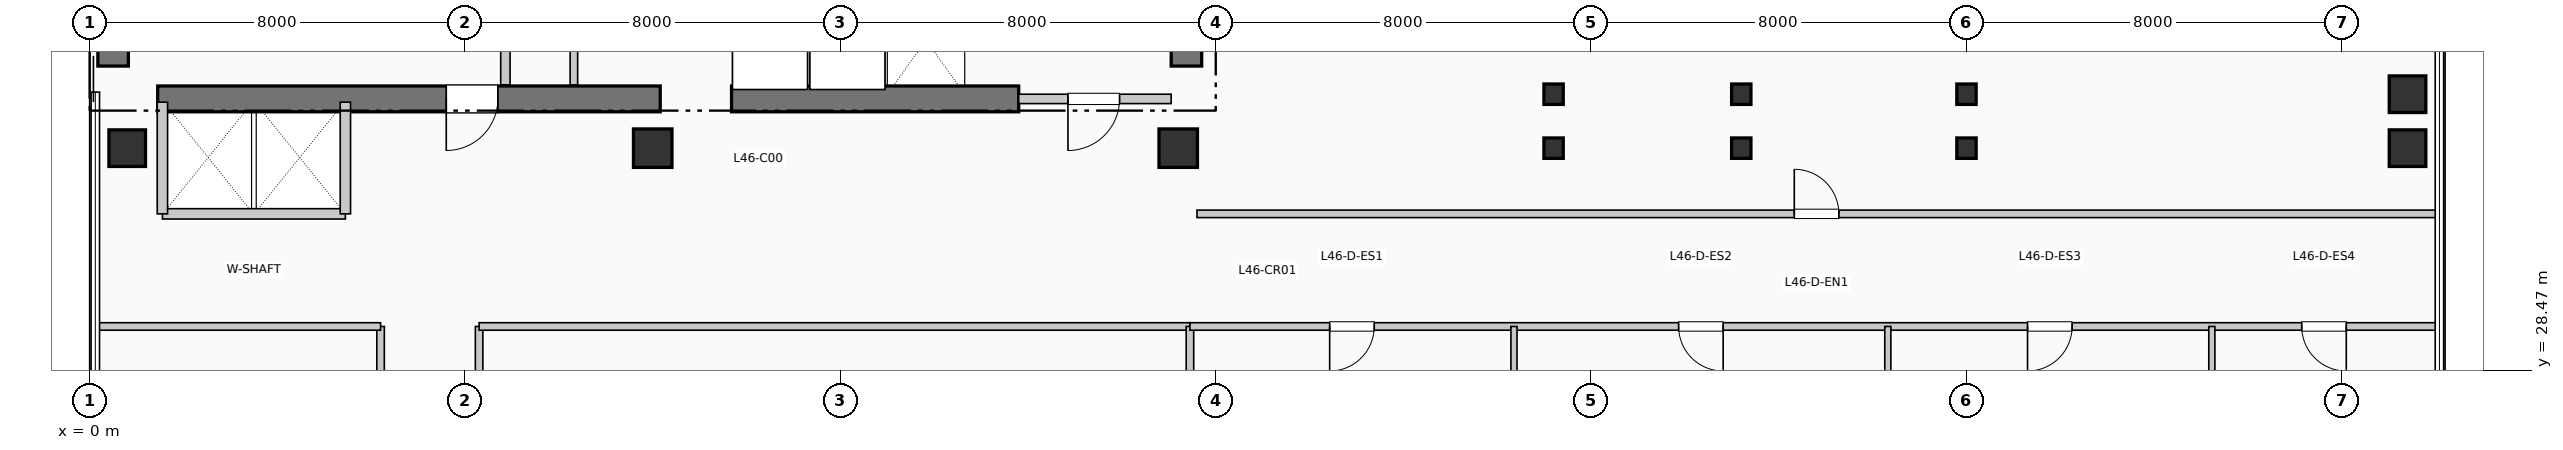
"""IFC4 building model, lengths in metres.
Left out: names, types, materials, properties, quantities, classifications, styles, units other than length and angle.
Written with IfcOpenShell. Run it as: python <this file> out.ifc"""

import sys

from ifc_helpers import new_model, si_unit, direction, frame, frame_2d, origin, origin_2d, place, context, subcontext, project, spatial, rectangle, i_section, extrude, element, fill, save


model = new_model("IFC4")
c1 = context("Model", 3, precision=1e-05, world=origin(), true_north=direction((0.0, 1.0)))
c2 = subcontext(c1, "Body", "Model", "MODEL_VIEW")
j1 = project(units=[si_unit("LENGTHUNIT", "METRE"), si_unit("PLANEANGLEUNIT", "RADIAN")], contexts=[c1])
p1 = place(None, origin())
s1 = spatial("IfcSite", under=j1, at=p1, CompositionType="ELEMENT")
p2 = place(p1, origin())
s2 = spatial("IfcBuilding", under=s1, at=p2, CompositionType="ELEMENT")
p3 = place(p2, frame((0.0, 0.0, 191.4)))
s3 = spatial("IfcBuildingStorey", under=s2, at=p3, CompositionType="ELEMENT", Elevation=191.4)
p4 = place(p3, frame((0.5, 34.95, 0.0), z_axis=(0.0, 0.0, 1.0), x_axis=(0.0, 1.0, 0.0)))
e1 = element("IfcWall", 1, at=p4, inside=s3, PredefinedType="SHEAR", context=c2, shape_type="SweptSolid", body=[
    extrude(rectangle(XDim=7.9, YDim=0.65, at=frame_2d((3.95, 0.0))), origin(), (0.0, 0.0, 1.0), 3.96),
])
p5 = place(p3, frame((23.375, 34.95, 0.0), z_axis=(0.0, 0.0, 1.0), x_axis=(0.0, 1.0, 0.0)))
e2 = element("IfcWall", 2, at=p5, inside=s3, PredefinedType="SHEAR", context=c2, shape_type="SweptSolid", body=[
    extrude(rectangle(XDim=10.64, YDim=0.65, at=frame_2d((5.32, 0.0))), origin(), (0.0, 0.0, 1.0), 3.96),
])
p6 = place(p3, frame((1.45, 34.25, 0.0), z_axis=(0.0, 0.0, 1.0), x_axis=(1.0, 0.0, 0.0)))
e3 = element("IfcWall", 3, at=p6, inside=s3, PredefinedType="SHEAR", context=c2, shape_type="SweptSolid", body=[
    extrude(rectangle(XDim=10.71, YDim=0.55, at=frame_2d((5.355, 0.0))), origin(), (0.0, 0.0, 1.0), 3.96),
])
p7 = place(p6, frame((7.25, 0.0, 0.0), z_axis=(0.0, 0.0, 1.0), x_axis=(-1.0, 0.0, 0.0)))
e4 = element("IfcOpeningElement", 4, at=p7, cuts=e3, PredefinedType="OPENING", context=c2, shape_type="SweptSolid", body=[
    extrude(rectangle(XDim=1.1, YDim=2.15, at=frame_2d((0.55, 1.075))), frame((0.0, 0.285, 0.0), z_axis=(0.0, -1.0, 0.0), x_axis=(1.0, 0.0, 0.0)), (0.0, 0.0, 1.0), 0.57),
])
p8 = place(p3, frame((13.68, 34.25, 0.0), z_axis=(0.0, 0.0, 1.0), x_axis=(1.0, 0.0, 0.0)))
e5 = element("IfcWall", 5, at=p8, inside=s3, PredefinedType="SHEAR", context=c2, shape_type="SweptSolid", body=[
    extrude(rectangle(XDim=6.12, YDim=0.55, at=frame_2d((3.06, 0.0))), origin(), (0.0, 0.0, 1.0), 3.96),
])
p9 = place(p3, frame((0.8, 33.2, 0.0), z_axis=(0.0, 0.0, 1.0), x_axis=(1.0, 0.0, 0.0)))
e6 = element("IfcColumn", 6, at=p9, inside=s3, PredefinedType="COLUMN", context=c2, shape_type="SweptSolid", body=[
    extrude(rectangle(XDim=0.78, YDim=0.78, at=origin_2d()), origin(), (0.0, 0.0, 1.0), 3.96),
])
for number, where, z_axis, x_axis in (
    (7, (12.0, 33.2, 0.0), (0.0, 0.0, 1.0), (1.0, 0.0, 0.0)),
    (8, (23.2, 33.2, 0.0), (0.0, 0.0, 1.0), (1.0, 0.0, 0.0)),
):
    element("IfcColumn", number, at=place(p3, frame(where, z_axis=z_axis, x_axis=x_axis)), inside=s3, PredefinedType="COLUMN", context=c2, shape_type="SweptSolid", body=[
        extrude(rectangle(XDim=0.82, YDim=0.82, at=origin_2d()), origin(), (0.0, 0.0, 1.0), 3.96),
    ])
for number, where, z_axis, x_axis in (
    (9, (31.2, 33.2, 0.0), (0.0, 0.0, 1.0), (1.0, 0.0, 0.0)),
    (10, (31.2, 34.35, 0.0), (0.0, 0.0, 1.0), (1.0, 0.0, 0.0)),
    (11, (35.2, 33.2, 0.0), (0.0, 0.0, 1.0), (1.0, 0.0, 0.0)),
    (12, (35.2, 34.35, 0.0), (0.0, 0.0, 1.0), (1.0, 0.0, 0.0)),
    (13, (40.0, 33.2, 0.0), (0.0, 0.0, 1.0), (1.0, 0.0, 0.0)),
    (14, (40.0, 34.35, 0.0), (0.0, 0.0, 1.0), (1.0, 0.0, 0.0)),
):
    element("IfcColumn", number, at=place(p3, frame(where, z_axis=z_axis, x_axis=x_axis)), inside=s3, PredefinedType="COLUMN", context=c2, shape_type="SweptSolid", body=[
        extrude(i_section(OverallWidth=0.412, OverallDepth=0.435, WebThickness=0.027, FlangeThickness=0.043, at=origin_2d()), origin(), (0.0, 0.0, 1.0), 3.96),
    ])
for number, where, z_axis, x_axis in (
    (15, (49.4, 33.2, 0.0), (0.0, 0.0, 1.0), (1.0, 0.0, 0.0)),
    (16, (49.4, 34.35, 0.0), (0.0, 0.0, 1.0), (1.0, 0.0, 0.0)),
):
    element("IfcColumn", number, at=place(p3, frame(where, z_axis=z_axis, x_axis=x_axis)), inside=s3, PredefinedType="COLUMN", context=c2, shape_type="SweptSolid", body=[
        extrude(rectangle(XDim=0.78, YDim=0.78, at=origin_2d()), origin(), (0.0, 0.0, 1.0), 3.96),
    ])
p10 = place(p3, frame((8.86, 34.55, 0.0), z_axis=(0.0, 0.0, 1.0), x_axis=(0.0, 1.0, 0.0)))
e17 = element("IfcWall", 17, at=p10, inside=s3, PredefinedType="PARTITIONING", context=c2, shape_type="SweptSolid", body=[
    extrude(rectangle(XDim=2.5, YDim=0.2, at=frame_2d((1.25, 0.0))), origin(), (0.0, 0.0, 1.0), 3.71),
])
p11 = place(p3, frame((19.8, 34.25, 0.0), z_axis=(0.0, 0.0, 1.0), x_axis=(1.0, 0.0, 0.0)))
e18 = element("IfcWall", 18, at=p11, inside=s3, PredefinedType="PARTITIONING", context=c2, shape_type="SweptSolid", body=[
    extrude(rectangle(XDim=3.25, YDim=0.2, at=frame_2d((1.625, 0.0))), origin(), (0.0, 0.0, 1.0), 3.71),
])
p12 = place(p11, frame((2.15, 0.0, 0.0), z_axis=(0.0, 0.0, 1.0), x_axis=(-1.0, 0.0, 0.0)))
e19 = element("IfcOpeningElement", 19, at=p12, cuts=e18, PredefinedType="OPENING", context=c2, shape_type="SweptSolid", body=[
    extrude(rectangle(XDim=1.1, YDim=2.15, at=frame_2d((0.55, 1.075))), frame((0.0, 0.11, 0.0), z_axis=(0.0, -1.0, 0.0), x_axis=(1.0, 0.0, 0.0)), (0.0, 0.0, 1.0), 0.22),
])
p13 = place(p3, frame((1.55, 31.8, 0.0), z_axis=(0.0, 0.0, 1.0), x_axis=(1.0, 0.0, 0.0)))
e20 = element("IfcWall", 20, at=p13, inside=s3, PredefinedType="PARTITIONING", context=c2, shape_type="SweptSolid", body=[
    extrude(rectangle(XDim=3.9, YDim=0.22, at=frame_2d((1.95, 0.0))), origin(), (0.0, 0.0, 1.0), 3.71),
])
for number, where, z_axis, x_axis in (
    (21, (1.55, 31.8, 0.0), (0.0, 0.0, 1.0), (0.0, 1.0, 0.0)),
    (22, (5.45, 31.8, 0.0), (0.0, 0.0, 1.0), (0.0, 1.0, 0.0)),
):
    element("IfcWall", number, at=place(p3, frame(where, z_axis=z_axis, x_axis=x_axis)), inside=s3, PredefinedType="PARTITIONING", context=c2, shape_type="SweptSolid", body=[
        extrude(rectangle(XDim=2.38, YDim=0.22, at=frame_2d((1.19, 0.0))), origin(), (0.0, 0.0, 1.0), 3.71),
    ])
p14 = place(p3, frame((10.32, 34.55, 0.0), z_axis=(0.0, 0.0, 1.0), x_axis=(0.0, 1.0, 0.0)))
e23 = element("IfcWall", 23, at=p14, inside=s3, PredefinedType="PARTITIONING", context=c2, shape_type="SweptSolid", body=[
    extrude(rectangle(XDim=2.15, YDim=0.16, at=frame_2d((1.075, 0.0))), origin(), (0.0, 0.0, 1.0), 3.71),
])
p15 = place(p3, frame((6.2, 10.2, 0.0), z_axis=(0.0, 0.0, 1.0), x_axis=(0.0, 1.0, 0.0)))
e24 = element("IfcWall", 24, at=p15, inside=s3, PredefinedType="PARTITIONING", context=c2, shape_type="SweptSolid", body=[
    extrude(rectangle(XDim=19.2, YDim=0.16, at=frame_2d((9.6, 0.0))), origin(), (0.0, 0.0, 1.0), 3.71),
])
p16 = place(p15, frame((3.739, 0.0, 0.0), z_axis=(0.0, 0.0, 1.0), x_axis=(-1.0, 0.0, 0.0)))
e25 = element("IfcOpeningElement", 25, at=p16, cuts=e24, PredefinedType="OPENING", context=c2, shape_type="SweptSolid", body=[
    extrude(rectangle(XDim=0.95, YDim=2.15, at=frame_2d((0.475, 1.075))), frame((0.0, 0.09, 0.0), z_axis=(0.0, -1.0, 0.0), x_axis=(1.0, 0.0, 0.0)), (0.0, 0.0, 1.0), 0.18),
])
p17 = place(p15, frame((10.075, 0.0, 0.0), z_axis=(0.0, 0.0, 1.0), x_axis=(-1.0, 0.0, 0.0)))
e26 = element("IfcOpeningElement", 26, at=p17, cuts=e24, PredefinedType="OPENING", context=c2, shape_type="SweptSolid", body=[
    extrude(rectangle(XDim=0.95, YDim=2.15, at=frame_2d((0.475, 1.075))), frame((0.0, 0.09, 0.0), z_axis=(0.0, -1.0, 0.0), x_axis=(1.0, 0.0, 0.0)), (0.0, 0.0, 1.0), 0.18),
])
p18 = place(p15, frame((16.411, 0.0, 0.0), z_axis=(0.0, 0.0, 1.0), x_axis=(-1.0, 0.0, 0.0)))
e27 = element("IfcOpeningElement", 27, at=p18, cuts=e24, PredefinedType="OPENING", context=c2, shape_type="SweptSolid", body=[
    extrude(rectangle(XDim=0.95, YDim=2.15, at=frame_2d((0.475, 1.075))), frame((0.0, 0.09, 0.0), z_axis=(0.0, -1.0, 0.0), x_axis=(1.0, 0.0, 0.0)), (0.0, 0.0, 1.0), 0.18),
])
p19 = place(p3, frame((8.3, 10.2, 0.0), z_axis=(0.0, 0.0, 1.0), x_axis=(0.0, 1.0, 0.0)))
e28 = element("IfcWall", 28, at=p19, inside=s3, PredefinedType="PARTITIONING", context=c2, shape_type="SweptSolid", body=[
    extrude(rectangle(XDim=19.2, YDim=0.16, at=frame_2d((9.6, 0.0))), origin(), (0.0, 0.0, 1.0), 3.71),
])
p20 = place(p19, frame((1.925, 0.0, 0.0)))
e29 = element("IfcOpeningElement", 29, at=p20, cuts=e28, PredefinedType="OPENING", context=c2, shape_type="SweptSolid", body=[
    extrude(rectangle(XDim=0.95, YDim=2.15, at=frame_2d((0.475, 1.075))), frame((0.0, 0.09, 0.0), z_axis=(0.0, -1.0, 0.0), x_axis=(1.0, 0.0, 0.0)), (0.0, 0.0, 1.0), 0.18),
])
p21 = place(p19, frame((7.301, 0.0, 0.0)))
e30 = element("IfcOpeningElement", 30, at=p21, cuts=e28, PredefinedType="OPENING", context=c2, shape_type="SweptSolid", body=[
    extrude(rectangle(XDim=0.95, YDim=2.15, at=frame_2d((0.475, 1.075))), frame((0.0, 0.09, 0.0), z_axis=(0.0, -1.0, 0.0), x_axis=(1.0, 0.0, 0.0)), (0.0, 0.0, 1.0), 0.18),
])
p22 = place(p19, frame((14.501, 0.0, 0.0)))
e31 = element("IfcOpeningElement", 31, at=p22, cuts=e28, PredefinedType="OPENING", context=c2, shape_type="SweptSolid", body=[
    extrude(rectangle(XDim=0.95, YDim=2.15, at=frame_2d((0.475, 1.075))), frame((0.0, 0.09, 0.0), z_axis=(0.0, -1.0, 0.0), x_axis=(1.0, 0.0, 0.0)), (0.0, 0.0, 1.0), 0.18),
])
p23 = place(p3, frame((0.19, 29.4, 0.0), z_axis=(0.0, 0.0, 1.0), x_axis=(1.0, 0.0, 0.0)))
e32 = element("IfcWall", 32, at=p23, inside=s3, PredefinedType="PARTITIONING", context=c2, shape_type="SweptSolid", body=[
    extrude(rectangle(XDim=6.01, YDim=0.16, at=frame_2d((3.005, 0.0))), origin(), (0.0, 0.0, 1.0), 3.365),
])
p24 = place(p3, frame((8.3, 29.4, 0.0), z_axis=(0.0, 0.0, 1.0), x_axis=(1.0, 0.0, 0.0)))
e33 = element("IfcWall", 33, at=p24, inside=s3, PredefinedType="PARTITIONING", context=c2, shape_type="SweptSolid", body=[
    extrude(rectangle(XDim=15.15, YDim=0.16, at=frame_2d((7.575, 0.0))), origin(), (0.0, 0.0, 1.0), 3.365),
])
p25 = place(p3, frame((23.45, 5.99, 0.0), z_axis=(0.0, 0.0, 1.0), x_axis=(0.0, 1.0, 0.0)))
e34 = element("IfcWall", 34, at=p25, inside=s3, PredefinedType="PARTITIONING", context=c2, shape_type="SweptSolid", body=[
    extrude(rectangle(XDim=23.41, YDim=0.16, at=frame_2d((11.705, 0.0))), origin(), (0.0, 0.0, 1.0), 3.095),
])
p26 = place(p3, frame((23.45, 29.4, 0.0), z_axis=(0.0, 0.0, 1.0), x_axis=(1.0, 0.0, 0.0)))
e35 = element("IfcWall", 35, at=p26, inside=s3, PredefinedType="PARTITIONING", context=c2, shape_type="SweptSolid", body=[
    extrude(rectangle(XDim=26.56, YDim=0.16, at=frame_2d((13.28, 0.0))), origin(), (0.0, 0.0, 1.0), 3.365),
])
p27 = place(p26, frame((3.928, 0.0, 0.0), z_axis=(0.0, 0.0, 1.0), x_axis=(-1.0, 0.0, 0.0)))
e36 = element("IfcOpeningElement", 36, at=p27, cuts=e35, PredefinedType="OPENING", context=c2, shape_type="SweptSolid", body=[
    extrude(rectangle(XDim=0.95, YDim=2.15, at=frame_2d((0.475, 1.075))), frame((0.0, 0.09, 0.0), z_axis=(0.0, -1.0, 0.0), x_axis=(1.0, 0.0, 0.0)), (0.0, 0.0, 1.0), 0.18),
])
p28 = place(p26, frame((11.365, 0.0, 0.0), z_axis=(0.0, 0.0, 1.0), x_axis=(-1.0, 0.0, 0.0)))
e37 = element("IfcOpeningElement", 37, at=p28, cuts=e35, PredefinedType="OPENING", context=c2, shape_type="SweptSolid", body=[
    extrude(rectangle(XDim=0.95, YDim=2.15, at=frame_2d((0.475, 1.075))), frame((0.0, 0.09, 0.0), z_axis=(0.0, -1.0, 0.0), x_axis=(1.0, 0.0, 0.0)), (0.0, 0.0, 1.0), 0.18),
])
p29 = place(p26, frame((18.801, 0.0, 0.0), z_axis=(0.0, 0.0, 1.0), x_axis=(-1.0, 0.0, 0.0)))
e38 = element("IfcOpeningElement", 38, at=p29, cuts=e35, PredefinedType="OPENING", context=c2, shape_type="SweptSolid", body=[
    extrude(rectangle(XDim=0.95, YDim=2.15, at=frame_2d((0.475, 1.075))), frame((0.0, 0.09, 0.0), z_axis=(0.0, -1.0, 0.0), x_axis=(1.0, 0.0, 0.0)), (0.0, 0.0, 1.0), 0.18),
])
p30 = place(p26, frame((24.645, 0.0, 0.0), z_axis=(0.0, 0.0, 1.0), x_axis=(-1.0, 0.0, 0.0)))
e39 = element("IfcOpeningElement", 39, at=p30, cuts=e35, PredefinedType="OPENING", context=c2, shape_type="SweptSolid", body=[
    extrude(rectangle(XDim=0.95, YDim=2.15, at=frame_2d((0.475, 1.075))), frame((0.0, 0.09, 0.0), z_axis=(0.0, -1.0, 0.0), x_axis=(1.0, 0.0, 0.0)), (0.0, 0.0, 1.0), 0.18),
])
p31 = place(p3, frame((23.6, 31.8, 0.0), z_axis=(0.0, 0.0, 1.0), x_axis=(1.0, 0.0, 0.0)))
e40 = element("IfcWall", 40, at=p31, inside=s3, PredefinedType="PARTITIONING", context=c2, shape_type="SweptSolid", body=[
    extrude(rectangle(XDim=26.41, YDim=0.16, at=frame_2d((13.205, 0.0))), origin(), (0.0, 0.0, 1.0), 3.71),
])
p32 = place(p31, frame((12.73, 0.0, 0.0)))
e41 = element("IfcOpeningElement", 41, at=p32, cuts=e40, PredefinedType="OPENING", context=c2, shape_type="SweptSolid", body=[
    extrude(rectangle(XDim=0.95, YDim=2.15, at=frame_2d((0.475, 1.075))), frame((0.0, 0.09, 0.0), z_axis=(0.0, -1.0, 0.0), x_axis=(1.0, 0.0, 0.0)), (0.0, 0.0, 1.0), 0.18),
])
for number, where, z_axis, x_axis in (
    (42, (30.356, 22.19, 0.0), (0.0, 0.0, 1.0), (0.0, 1.0, 0.0)),
    (43, (38.323, 22.19, 0.0), (0.0, 0.0, 1.0), (0.0, 1.0, 0.0)),
    (44, (45.229, 22.19, 0.0), (0.0, 0.0, 1.0), (0.0, 1.0, 0.0)),
):
    element("IfcWall", number, at=place(p3, frame(where, z_axis=z_axis, x_axis=x_axis)), inside=s3, PredefinedType="PARTITIONING", context=c2, shape_type="SweptSolid", body=[
        extrude(rectangle(XDim=7.21, YDim=0.13, at=frame_2d((3.605, 0.0))), origin(), (0.0, 0.0, 1.0), 3.71),
    ])
p33 = place(p7, origin())
e45 = element("IfcDoor", 45, at=p33, inside=s3, OperationType="SINGLE_SWING_LEFT", PredefinedType="DOOR", context=c2, shape_type="SweptSolid", body=[
    extrude(rectangle(XDim=1.1, YDim=2.15, at=frame_2d((0.55, 1.075))), frame((0.0, 0.025, 0.0), z_axis=(0.0, -1.0, 0.0), x_axis=(1.0, 0.0, 0.0)), (0.0, 0.0, 1.0), 0.05),
])
fill(e4, e45)
p34 = place(p12, origin())
e46 = element("IfcDoor", 46, at=p34, inside=s3, OperationType="SINGLE_SWING_LEFT", PredefinedType="DOOR", context=c2, shape_type="SweptSolid", body=[
    extrude(rectangle(XDim=1.1, YDim=2.15, at=frame_2d((0.55, 1.075))), frame((0.0, 0.025, 0.0), z_axis=(0.0, -1.0, 0.0), x_axis=(1.0, 0.0, 0.0)), (0.0, 0.0, 1.0), 0.05),
])
fill(e19, e46)
p35 = place(p27, origin())
e47 = element("IfcDoor", 47, at=p35, inside=s3, OperationType="SINGLE_SWING_LEFT", PredefinedType="DOOR", context=c2, shape_type="SweptSolid", body=[
    extrude(rectangle(XDim=0.95, YDim=2.15, at=frame_2d((0.475, 1.075))), frame((0.0, 0.025, 0.0), z_axis=(0.0, -1.0, 0.0), x_axis=(1.0, 0.0, 0.0)), (0.0, 0.0, 1.0), 0.05),
])
fill(e36, e47)
p36 = place(p28, origin())
e48 = element("IfcDoor", 48, at=p36, inside=s3, OperationType="SINGLE_SWING_RIGHT", PredefinedType="DOOR", context=c2, shape_type="SweptSolid", body=[
    extrude(rectangle(XDim=0.95, YDim=2.15, at=frame_2d((0.475, 1.075))), frame((0.0, 0.025, 0.0), z_axis=(0.0, -1.0, 0.0), x_axis=(1.0, 0.0, 0.0)), (0.0, 0.0, 1.0), 0.05),
])
fill(e37, e48)
p37 = place(p29, origin())
e49 = element("IfcDoor", 49, at=p37, inside=s3, OperationType="SINGLE_SWING_LEFT", PredefinedType="DOOR", context=c2, shape_type="SweptSolid", body=[
    extrude(rectangle(XDim=0.95, YDim=2.15, at=frame_2d((0.475, 1.075))), frame((0.0, 0.025, 0.0), z_axis=(0.0, -1.0, 0.0), x_axis=(1.0, 0.0, 0.0)), (0.0, 0.0, 1.0), 0.05),
])
fill(e38, e49)
p38 = place(p30, origin())
e50 = element("IfcDoor", 50, at=p38, inside=s3, OperationType="SINGLE_SWING_RIGHT", PredefinedType="DOOR", context=c2, shape_type="SweptSolid", body=[
    extrude(rectangle(XDim=0.95, YDim=2.15, at=frame_2d((0.475, 1.075))), frame((0.0, 0.025, 0.0), z_axis=(0.0, -1.0, 0.0), x_axis=(1.0, 0.0, 0.0)), (0.0, 0.0, 1.0), 0.05),
])
fill(e39, e50)
p39 = place(p32, origin())
e51 = element("IfcDoor", 51, at=p39, inside=s3, OperationType="SINGLE_SWING_LEFT", PredefinedType="DOOR", context=c2, shape_type="SweptSolid", body=[
    extrude(rectangle(XDim=0.95, YDim=2.15, at=frame_2d((0.475, 1.075))), frame((0.0, 0.025, 0.0), z_axis=(0.0, -1.0, 0.0), x_axis=(1.0, 0.0, 0.0)), (0.0, 0.0, 1.0), 0.05),
])
fill(e41, e51)
save(model, sys.argv[1])
